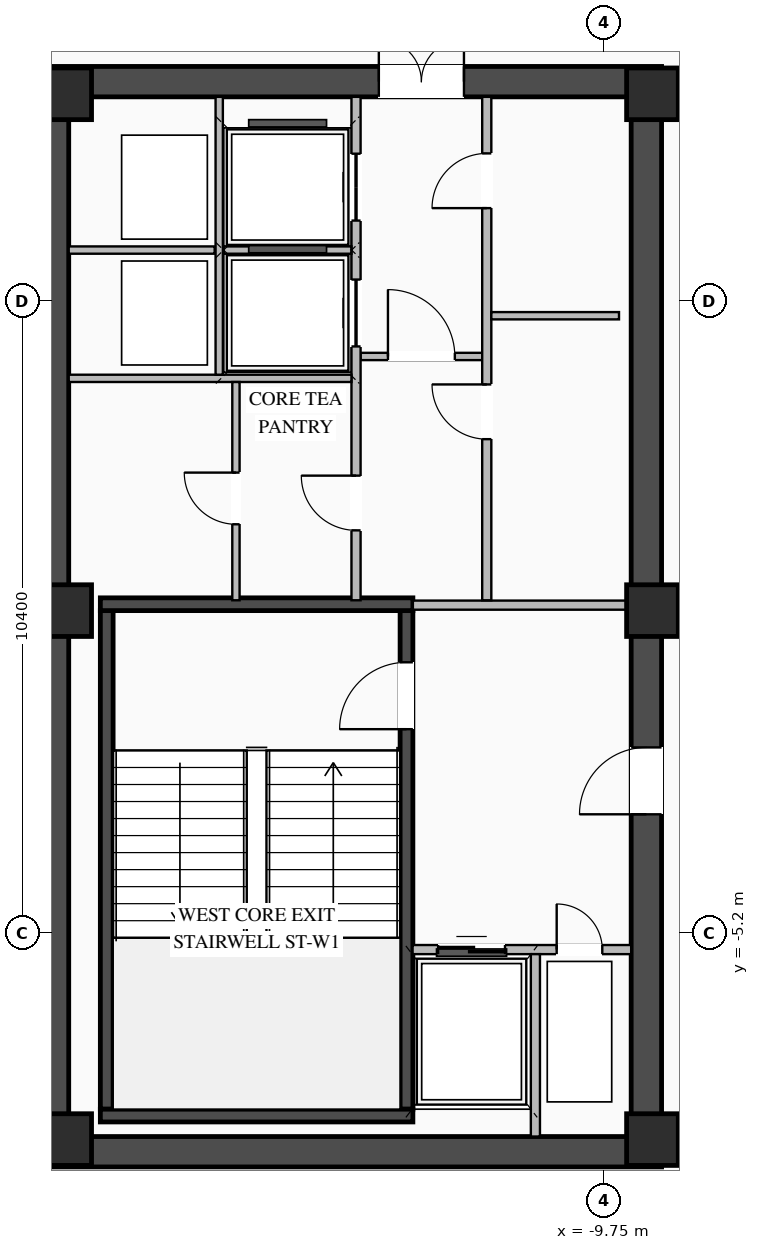
"""IFC4 building model, lengths in metres.
Left out: names, types, materials, properties, quantities, classifications, styles, units other than length and angle.
Written with IfcOpenShell. Run it as: python <this file> out.ifc"""

import sys

from ifc_helpers import new_model, si_unit, direction, frame, frame_2d, origin, origin_2d, place, context, subcontext, project, spatial, rectangle, extrude, element, fill, save


model = new_model("IFC4")
c1 = context("Model", 3, precision=1e-05, world=origin(), true_north=direction((0.0, 1.0)))
c2 = subcontext(c1, "Body", "Model", "MODEL_VIEW")
j1 = project(units=[si_unit("LENGTHUNIT", "METRE"), si_unit("PLANEANGLEUNIT", "RADIAN")], contexts=[c1])
p1 = place(None, origin())
s1 = spatial("IfcSite", under=j1, at=p1, CompositionType="ELEMENT")
p2 = place(p1, origin())
s2 = spatial("IfcBuilding", under=s1, at=p2, CompositionType="ELEMENT")
p3 = place(p2, frame((0.0, 0.0, 282.75)))
s3 = spatial("IfcBuildingStorey", under=s2, at=p3, CompositionType="ELEMENT", Elevation=282.75)
p4 = place(p3, frame((-19.05, -8.8, 0.0), z_axis=(0.0, 0.0, 1.0), x_axis=(1.0, 0.0, 0.0)))
e1 = element("IfcWall", 1, at=p4, inside=s3, PredefinedType="SHEAR", context=c2, shape_type="SweptSolid", body=[
    extrude(rectangle(XDim=10.25, YDim=0.5, at=frame_2d((5.125, 0.0))), origin(), (0.0, 0.0, 1.0), 3.95),
])
p5 = place(p3, frame((-19.05, 8.8, 0.0), z_axis=(0.0, 0.0, 1.0), x_axis=(1.0, 0.0, 0.0)))
e2 = element("IfcWall", 2, at=p5, inside=s3, PredefinedType="SHEAR", context=c2, shape_type="SweptSolid", body=[
    extrude(rectangle(XDim=10.25, YDim=0.5, at=frame_2d((5.125, 0.0))), origin(), (0.0, 0.0, 1.0), 3.95),
])
p6 = place(p5, frame((5.6, 0.0, 0.0)))
e3 = element("IfcOpeningElement", 3, at=p6, cuts=e2, PredefinedType="OPENING", context=c2, shape_type="SweptSolid", body=[
    extrude(rectangle(XDim=1.4, YDim=2.05, at=frame_2d((0.7, 1.025))), frame((0.0, 0.26, 0.0), z_axis=(0.0, -1.0, 0.0), x_axis=(1.0, 0.0, 0.0)), (0.0, 0.0, 1.0), 0.52),
])
p7 = place(p3, frame((-18.8, -8.55, 0.0), z_axis=(0.0, 0.0, 1.0), x_axis=(0.0, 1.0, 0.0)))
e4 = element("IfcWall", 4, at=p7, inside=s3, PredefinedType="SHEAR", context=c2, shape_type="SweptSolid", body=[
    extrude(rectangle(XDim=17.1, YDim=0.5, at=frame_2d((8.55, 0.0))), origin(), (0.0, 0.0, 1.0), 3.95),
])
p8 = place(p3, frame((-9.05, -8.55, 0.0), z_axis=(0.0, 0.0, 1.0), x_axis=(0.0, 1.0, 0.0)))
e5 = element("IfcWall", 5, at=p8, inside=s3, PredefinedType="SHEAR", context=c2, shape_type="SweptSolid", body=[
    extrude(rectangle(XDim=17.1, YDim=0.5, at=frame_2d((8.55, 0.0))), origin(), (0.0, 0.0, 1.0), 3.95),
])
p9 = place(p8, frame((5.3, 0.0, 0.0)))
e6 = element("IfcOpeningElement", 6, at=p9, cuts=e5, PredefinedType="OPENING", context=c2, shape_type="SweptSolid", body=[
    extrude(rectangle(XDim=1.1, YDim=2.08, at=frame_2d((0.55, 1.04))), frame((0.0, 0.26, 0.0), z_axis=(0.0, -1.0, 0.0), x_axis=(1.0, 0.0, 0.0)), (0.0, 0.0, 1.0), 0.52),
])
p10 = place(p3, frame((-12.995, -8.1, 0.0), z_axis=(0.0, 0.0, 1.0), x_axis=(0.0, 1.0, 0.0)))
e7 = element("IfcWall", 7, at=p10, inside=s3, PredefinedType="SHEAR", context=c2, shape_type="SweptSolid", body=[
    extrude(rectangle(XDim=8.2, YDim=0.21, at=frame_2d((4.1, 0.0))), origin(), (0.0, 0.0, 1.0), 3.95),
])
p11 = place(p10, frame((6.25, 0.0, 0.0)))
e8 = element("IfcOpeningElement", 8, at=p11, cuts=e7, PredefinedType="OPENING", context=c2, shape_type="SweptSolid", body=[
    extrude(rectangle(XDim=1.1, YDim=2.15, at=frame_2d((0.55, 1.075))), frame((0.0, 0.115, 0.0), z_axis=(0.0, -1.0, 0.0), x_axis=(1.0, 0.0, 0.0)), (0.0, 0.0, 1.0), 0.23),
])
p12 = place(p3, frame((-17.925, -8.1, 0.0), z_axis=(0.0, 0.0, 1.0), x_axis=(0.0, 1.0, 0.0)))
e9 = element("IfcWall", 9, at=p12, inside=s3, PredefinedType="SHEAR", context=c2, shape_type="SweptSolid", body=[
    extrude(rectangle(XDim=8.2, YDim=0.21, at=frame_2d((4.1, 0.0))), origin(), (0.0, 0.0, 1.0), 3.95),
])
for number, where, z_axis, x_axis in (
    (10, (-18.03, -8.205, 0.0), (0.0, 0.0, 1.0), (1.0, 0.0, 0.0)),
    (11, (-12.89, 0.205, 0.0), (0.0, 0.0, 1.0), (-1.0, 0.0, 0.0)),
):
    element("IfcWall", number, at=place(p3, frame(where, z_axis=z_axis, x_axis=x_axis)), inside=s3, PredefinedType="SHEAR", context=c2, shape_type="SweptSolid", body=[
        extrude(rectangle(XDim=5.14, YDim=0.21, at=frame_2d((2.57, 0.0))), origin(), (0.0, 0.0, 1.0), 3.95),
    ])
for number, where, z_axis, x_axis in (
    (12, (-8.95, -8.6, 0.0), (0.0, 0.0, 1.0), (1.0, 0.0, 0.0)),
    (13, (-8.95, 0.1, 0.0), (0.0, 0.0, 1.0), (1.0, 0.0, 0.0)),
    (14, (-8.95, 8.6, 0.0), (0.0, 0.0, 1.0), (1.0, 0.0, 0.0)),
    (15, (-18.6, -8.6, 0.0), (0.0, 0.0, 1.0), (1.0, 0.0, 0.0)),
    (16, (-18.6, 0.1, 0.0), (0.0, 0.0, 1.0), (1.0, 0.0, 0.0)),
    (17, (-18.6, 8.6, 0.0), (0.0, 0.0, 1.0), (1.0, 0.0, 0.0)),
):
    element("IfcColumn", number, at=place(p3, frame(where, z_axis=z_axis, x_axis=x_axis)), inside=s3, PredefinedType="COLUMN", context=c2, shape_type="SweptSolid", body=[
        extrude(rectangle(XDim=0.85, YDim=0.85, at=origin_2d()), origin(), (0.0, 0.0, 1.0), 4.2),
    ])
p13 = place(p3, frame((-12.895, -5.475, 0.0), z_axis=(0.0, 0.0, 1.0), x_axis=(1.0, 0.0, 0.0)))
e18 = element("IfcWall", 18, at=p13, inside=s3, PredefinedType="STANDARD", context=c2, shape_type="SweptSolid", body=[
    extrude(rectangle(XDim=3.595, YDim=0.15, at=frame_2d((1.797, 0.0))), origin(), (0.0, 0.0, 1.0), 3.93),
])
p14 = place(p13, frame((0.42, 0.0, 0.0)))
e19 = element("IfcOpeningElement", 19, at=p14, cuts=e18, PredefinedType="OPENING", context=c2, shape_type="SweptSolid", body=[
    extrude(rectangle(XDim=1.1, YDim=2.15, at=frame_2d((0.55, 1.075))), frame((0.0, 0.085, 0.0), z_axis=(0.0, -1.0, 0.0), x_axis=(1.0, 0.0, 0.0)), (0.0, 0.0, 1.0), 0.17),
])
p15 = place(p13, frame((2.37, 0.0, 0.0)))
e20 = element("IfcOpeningElement", 20, at=p15, cuts=e18, PredefinedType="OPENING", context=c2, shape_type="SweptSolid", body=[
    extrude(rectangle(XDim=0.75, YDim=2.05, at=frame_2d((0.375, 1.025))), frame((0.0, 0.085, 0.0), z_axis=(0.0, -1.0, 0.0), x_axis=(1.0, 0.0, 0.0)), (0.0, 0.0, 1.0), 0.17),
])
p16 = place(p3, frame((-10.875, -8.55, 0.0), z_axis=(0.0, 0.0, 1.0), x_axis=(0.0, 1.0, 0.0)))
e21 = element("IfcWall", 21, at=p16, inside=s3, PredefinedType="STANDARD", context=c2, shape_type="SweptSolid", body=[
    extrude(rectangle(XDim=3.0, YDim=0.15, at=frame_2d((1.5, 0.0))), origin(), (0.0, 0.0, 1.0), 3.93),
])
p17 = place(p3, frame((-12.89, 0.19, 0.0), z_axis=(0.0, 0.0, 1.0), x_axis=(1.0, 0.0, 0.0)))
e22 = element("IfcWall", 22, at=p17, inside=s3, PredefinedType="STANDARD", context=c2, shape_type="SweptSolid", body=[
    extrude(rectangle(XDim=3.59, YDim=0.15, at=frame_2d((1.795, 0.0))), origin(), (0.0, 0.0, 1.0), 3.425),
])
p18 = place(p3, frame((-13.75, 4.28, 0.0), z_axis=(0.0, 0.0, 1.0), x_axis=(1.0, 0.0, 0.0)))
e23 = element("IfcWall", 23, at=p18, inside=s3, PredefinedType="STANDARD", context=c2, shape_type="SweptSolid", body=[
    extrude(rectangle(XDim=2.0, YDim=0.12, at=frame_2d((1.0, 0.0))), origin(), (0.0, 0.0, 1.0), 3.93),
])
p19 = place(p18, frame((0.45, 0.0, 0.0)))
e24 = element("IfcOpeningElement", 24, at=p19, cuts=e23, PredefinedType="OPENING", context=c2, shape_type="SweptSolid", body=[
    extrude(rectangle(XDim=1.1, YDim=2.1, at=frame_2d((0.55, 1.05))), frame((0.0, 0.07, 0.0), z_axis=(0.0, -1.0, 0.0), x_axis=(1.0, 0.0, 0.0)), (0.0, 0.0, 1.0), 0.14),
])
p20 = place(p3, frame((-11.675, 0.27, 0.0), z_axis=(0.0, 0.0, 1.0), x_axis=(0.0, 1.0, 0.0)))
e25 = element("IfcWall", 25, at=p20, inside=s3, PredefinedType="STANDARD", context=c2, shape_type="SweptSolid", body=[
    extrude(rectangle(XDim=8.28, YDim=0.15, at=frame_2d((4.14, 0.0))), origin(), (0.0, 0.0, 1.0), 3.93),
])
p21 = place(p20, frame((2.65, 0.0, 0.0)))
e26 = element("IfcOpeningElement", 26, at=p21, cuts=e25, PredefinedType="OPENING", context=c2, shape_type="SweptSolid", body=[
    extrude(rectangle(XDim=0.9, YDim=2.05, at=frame_2d((0.45, 1.025))), frame((0.0, 0.085, 0.0), z_axis=(0.0, -1.0, 0.0), x_axis=(1.0, 0.0, 0.0)), (0.0, 0.0, 1.0), 0.17),
])
p22 = place(p20, frame((6.45, 0.0, 0.0)))
e27 = element("IfcOpeningElement", 27, at=p22, cuts=e25, PredefinedType="OPENING", context=c2, shape_type="SweptSolid", body=[
    extrude(rectangle(XDim=0.9, YDim=2.05, at=frame_2d((0.45, 1.025))), frame((0.0, 0.085, 0.0), z_axis=(0.0, -1.0, 0.0), x_axis=(1.0, 0.0, 0.0)), (0.0, 0.0, 1.0), 0.17),
])
p23 = place(p3, frame((-11.6, 4.95, 0.0), z_axis=(0.0, 0.0, 1.0), x_axis=(1.0, 0.0, 0.0)))
e28 = element("IfcWall", 28, at=p23, inside=s3, PredefinedType="STANDARD", context=c2, shape_type="SweptSolid", body=[
    extrude(rectangle(XDim=2.1, YDim=0.12, at=frame_2d((1.05, 0.0))), origin(), (0.0, 0.0, 1.0), 3.93),
])
p24 = place(p3, frame((-13.825, 0.27, 0.0), z_axis=(0.0, 0.0, 1.0), x_axis=(0.0, 1.0, 0.0)))
e29 = element("IfcWall", 29, at=p24, inside=s3, PredefinedType="STANDARD", context=c2, shape_type="SweptSolid", body=[
    extrude(rectangle(XDim=8.28, YDim=0.15, at=frame_2d((4.14, 0.0))), origin(), (0.0, 0.0, 1.0), 3.93),
])
p25 = place(p24, frame((4.175, 0.0, 0.0)))
e30 = element("IfcOpeningElement", 30, at=p25, cuts=e29, PredefinedType="OPENING", context=c2, shape_type="SweptSolid", body=[
    extrude(rectangle(XDim=1.1, YDim=2.1, at=frame_2d((0.55, 1.05))), frame((0.0, 0.085, 0.0), z_axis=(0.0, -1.0, 0.0), x_axis=(1.0, 0.0, 0.0)), (0.0, 0.0, 1.0), 0.17),
])
p26 = place(p24, frame((6.245, 0.0, 0.0)))
e31 = element("IfcOpeningElement", 31, at=p26, cuts=e29, PredefinedType="OPENING", context=c2, shape_type="SweptSolid", body=[
    extrude(rectangle(XDim=1.1, YDim=2.1, at=frame_2d((0.55, 1.05))), frame((0.0, 0.085, 0.0), z_axis=(0.0, -1.0, 0.0), x_axis=(1.0, 0.0, 0.0)), (0.0, 0.0, 1.0), 0.17),
])
p27 = place(p24, frame((1.15, 0.0, 0.0)))
e32 = element("IfcOpeningElement", 32, at=p27, cuts=e29, PredefinedType="OPENING", context=c2, shape_type="SweptSolid", body=[
    extrude(rectangle(XDim=0.9, YDim=2.05, at=frame_2d((0.45, 1.025))), frame((0.0, 0.085, 0.0), z_axis=(0.0, -1.0, 0.0), x_axis=(1.0, 0.0, 0.0)), (0.0, 0.0, 1.0), 0.17),
])
p28 = place(p3, frame((-18.55, 3.92, 0.0), z_axis=(0.0, 0.0, 1.0), x_axis=(1.0, 0.0, 0.0)))
e33 = element("IfcWall", 33, at=p28, inside=s3, PredefinedType="STANDARD", context=c2, shape_type="SweptSolid", body=[
    extrude(rectangle(XDim=4.65, YDim=0.12, at=frame_2d((2.325, 0.0))), origin(), (0.0, 0.0, 1.0), 3.93),
])
p29 = place(p3, frame((-18.55, 6.03, 0.0), z_axis=(0.0, 0.0, 1.0), x_axis=(1.0, 0.0, 0.0)))
e34 = element("IfcWall", 34, at=p29, inside=s3, PredefinedType="STANDARD", context=c2, shape_type="SweptSolid", body=[
    extrude(rectangle(XDim=2.4, YDim=0.12, at=frame_2d((1.2, 0.0))), origin(), (0.0, 0.0, 1.0), 3.93),
])
p30 = place(p3, frame((-16.075, 3.98, 0.0), z_axis=(0.0, 0.0, 1.0), x_axis=(0.0, 1.0, 0.0)))
e35 = element("IfcWall", 35, at=p30, inside=s3, PredefinedType="STANDARD", context=c2, shape_type="SweptSolid", body=[
    extrude(rectangle(XDim=4.57, YDim=0.12, at=frame_2d((2.285, 0.0))), origin(), (0.0, 0.0, 1.0), 3.93),
])
p31 = place(p3, frame((-16.0, 6.03, 0.0), z_axis=(0.0, 0.0, 1.0), x_axis=(1.0, 0.0, 0.0)))
e36 = element("IfcWall", 36, at=p31, inside=s3, PredefinedType="STANDARD", context=c2, shape_type="SweptSolid", body=[
    extrude(rectangle(XDim=2.1, YDim=0.12, at=frame_2d((1.05, 0.0))), origin(), (0.0, 0.0, 1.0), 3.93),
])
p32 = place(p3, frame((-15.8, 0.27, 0.0), z_axis=(0.0, 0.0, 1.0), x_axis=(0.0, 1.0, 0.0)))
e37 = element("IfcWall", 37, at=p32, inside=s3, PredefinedType="STANDARD", context=c2, shape_type="SweptSolid", body=[
    extrude(rectangle(XDim=3.59, YDim=0.12, at=frame_2d((1.795, 0.0))), origin(), (0.0, 0.0, 1.0), 3.93),
])
p33 = place(p32, frame((1.25, 0.0, 0.0)))
e38 = element("IfcOpeningElement", 38, at=p33, cuts=e37, PredefinedType="OPENING", context=c2, shape_type="SweptSolid", body=[
    extrude(rectangle(XDim=0.85, YDim=2.05, at=frame_2d((0.425, 1.025))), frame((0.0, 0.07, 0.0), z_axis=(0.0, -1.0, 0.0), x_axis=(1.0, 0.0, 0.0)), (0.0, 0.0, 1.0), 0.14),
])
p34 = place(p11, origin())
e39 = element("IfcDoor", 39, at=p34, inside=s3, OperationType="SINGLE_SWING_LEFT", PredefinedType="DOOR", context=c2, shape_type="SweptSolid", body=[
    extrude(rectangle(XDim=1.1, YDim=2.15, at=frame_2d((0.55, 1.075))), frame((0.0, 0.025, 0.0), z_axis=(0.0, -1.0, 0.0), x_axis=(1.0, 0.0, 0.0)), (0.0, 0.0, 1.0), 0.05),
])
fill(e8, e39)
p35 = place(p14, origin())
e40 = element("IfcDoor", 40, at=p35, inside=s3, OperationType="DOUBLE_DOOR_SLIDING", PredefinedType="DOOR", context=c2, shape_type="SweptSolid", body=[
    extrude(rectangle(XDim=1.1, YDim=2.15, at=frame_2d((0.55, 1.075))), frame((0.0, 0.025, 0.0), z_axis=(0.0, -1.0, 0.0), x_axis=(1.0, 0.0, 0.0)), (0.0, 0.0, 1.0), 0.05),
])
fill(e19, e40)
p36 = place(p15, origin())
e41 = element("IfcDoor", 41, at=p36, inside=s3, OperationType="SINGLE_SWING_LEFT", PredefinedType="DOOR", context=c2, shape_type="SweptSolid", body=[
    extrude(rectangle(XDim=0.75, YDim=2.05, at=frame_2d((0.375, 1.025))), frame((0.0, 0.025, 0.0), z_axis=(0.0, -1.0, 0.0), x_axis=(1.0, 0.0, 0.0)), (0.0, 0.0, 1.0), 0.05),
])
fill(e20, e41)
p37 = place(p9, origin())
e42 = element("IfcDoor", 42, at=p37, inside=s3, OperationType="SINGLE_SWING_LEFT", PredefinedType="DOOR", context=c2, shape_type="SweptSolid", body=[
    extrude(rectangle(XDim=1.1, YDim=2.08, at=frame_2d((0.55, 1.04))), frame((0.0, 0.205, 0.0), z_axis=(0.0, -1.0, 0.0), x_axis=(1.0, 0.0, 0.0)), (0.0, 0.0, 1.0), 0.05),
])
fill(e6, e42)
p38 = place(p19, origin())
e43 = element("IfcDoor", 43, at=p38, inside=s3, OperationType="SINGLE_SWING_LEFT", PredefinedType="DOOR", context=c2, shape_type="SweptSolid", body=[
    extrude(rectangle(XDim=1.1, YDim=2.1, at=frame_2d((0.55, 1.05))), frame((0.0, 0.025, 0.0), z_axis=(0.0, -1.0, 0.0), x_axis=(1.0, 0.0, 0.0)), (0.0, 0.0, 1.0), 0.05),
])
fill(e24, e43)
p39 = place(p6, origin())
e44 = element("IfcDoor", 44, at=p39, inside=s3, OperationType="DOUBLE_DOOR_SINGLE_SWING", PredefinedType="DOOR", context=c2, shape_type="SweptSolid", body=[
    extrude(rectangle(XDim=1.4, YDim=2.05, at=frame_2d((0.7, 1.025))), frame((0.0, 0.195, 0.0), z_axis=(0.0, -1.0, 0.0), x_axis=(1.0, 0.0, 0.0)), (0.0, 0.0, 1.0), 0.05),
])
fill(e3, e44)
p40 = place(p21, origin())
e45 = element("IfcDoor", 45, at=p40, inside=s3, OperationType="SINGLE_SWING_RIGHT", PredefinedType="DOOR", context=c2, shape_type="SweptSolid", body=[
    extrude(rectangle(XDim=0.9, YDim=2.05, at=frame_2d((0.45, 1.025))), frame((0.0, 0.025, 0.0), z_axis=(0.0, -1.0, 0.0), x_axis=(1.0, 0.0, 0.0)), (0.0, 0.0, 1.0), 0.05),
])
fill(e26, e45)
p41 = place(p22, origin())
e46 = element("IfcDoor", 46, at=p41, inside=s3, OperationType="SINGLE_SWING_LEFT", PredefinedType="DOOR", context=c2, shape_type="SweptSolid", body=[
    extrude(rectangle(XDim=0.9, YDim=2.05, at=frame_2d((0.45, 1.025))), frame((0.0, 0.025, 0.0), z_axis=(0.0, -1.0, 0.0), x_axis=(1.0, 0.0, 0.0)), (0.0, 0.0, 1.0), 0.05),
])
fill(e27, e46)
p42 = place(p25, origin())
e47 = element("IfcDoor", 47, at=p42, inside=s3, OperationType="DOUBLE_DOOR_SLIDING", PredefinedType="DOOR", context=c2, shape_type="SweptSolid", body=[
    extrude(rectangle(XDim=1.1, YDim=2.1, at=frame_2d((0.55, 1.05))), frame((0.0, 0.025, 0.0), z_axis=(0.0, -1.0, 0.0), x_axis=(1.0, 0.0, 0.0)), (0.0, 0.0, 1.0), 0.05),
])
fill(e30, e47)
p43 = place(p26, origin())
e48 = element("IfcDoor", 48, at=p43, inside=s3, OperationType="DOUBLE_DOOR_SLIDING", PredefinedType="DOOR", context=c2, shape_type="SweptSolid", body=[
    extrude(rectangle(XDim=1.1, YDim=2.1, at=frame_2d((0.55, 1.05))), frame((0.0, 0.025, 0.0), z_axis=(0.0, -1.0, 0.0), x_axis=(1.0, 0.0, 0.0)), (0.0, 0.0, 1.0), 0.05),
])
fill(e31, e48)
p44 = place(p27, origin())
e49 = element("IfcDoor", 49, at=p44, inside=s3, OperationType="SINGLE_SWING_RIGHT", PredefinedType="DOOR", context=c2, shape_type="SweptSolid", body=[
    extrude(rectangle(XDim=0.9, YDim=2.05, at=frame_2d((0.45, 1.025))), frame((0.0, 0.025, 0.0), z_axis=(0.0, -1.0, 0.0), x_axis=(1.0, 0.0, 0.0)), (0.0, 0.0, 1.0), 0.05),
])
fill(e32, e49)
p45 = place(p33, origin())
e50 = element("IfcDoor", 50, at=p45, inside=s3, OperationType="SINGLE_SWING_RIGHT", PredefinedType="DOOR", context=c2, shape_type="SweptSolid", body=[
    extrude(rectangle(XDim=0.85, YDim=2.05, at=frame_2d((0.425, 1.025))), frame((0.0, 0.025, 0.0), z_axis=(0.0, -1.0, 0.0), x_axis=(1.0, 0.0, 0.0)), (0.0, 0.0, 1.0), 0.05),
])
fill(e38, e50)
save(model, sys.argv[1])
